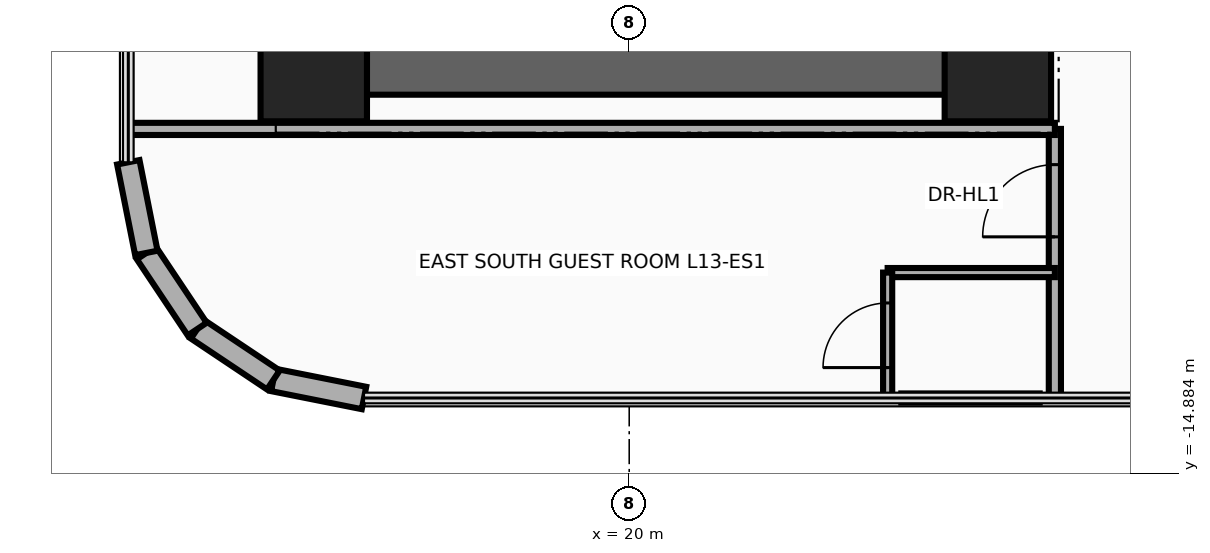
"""IFC4 building model, lengths in metres.
Left out: names, types, materials, properties, quantities, classifications, styles, units other than length and angle.
Written with IfcOpenShell. Run it as: python <this file> out.ifc"""

import sys

from ifc_helpers import new_model, si_unit, direction, frame, frame_2d, origin, origin_2d, place, context, subcontext, project, spatial, rectangle, extrude, source, transform, mapped, element, fill, save


model = new_model("IFC4")
c1 = context("Model", 3, precision=1e-05, world=origin(), true_north=direction((0.0, 1.0)))
c2 = subcontext(c1, "Body", "Model", "MODEL_VIEW")
j1 = project(units=[si_unit("LENGTHUNIT", "METRE"), si_unit("PLANEANGLEUNIT", "RADIAN")], contexts=[c1])
p1 = place(None, origin())
s1 = spatial("IfcSite", under=j1, at=p1, CompositionType="ELEMENT")
p2 = place(p1, origin())
s2 = spatial("IfcBuilding", under=s1, at=p2, CompositionType="ELEMENT")
p3 = place(p2, frame((0.0, 0.0, 55.6)))
s3 = spatial("IfcBuildingStorey", under=s2, at=p3, CompositionType="ELEMENT", Elevation=55.6)
p4 = place(p3, frame((24.85, -9.9, 0.0), z_axis=(0.0, 0.0, 1.0), x_axis=(0.0, 1.0, 0.0)))
e1 = element("IfcWall", 1, at=p4, inside=s3, PredefinedType="SHEAR", context=c2, shape_type="SweptSolid", body=[
    extrude(rectangle(XDim=8.95, YDim=0.7, at=frame_2d((4.475, 0.0))), origin(), (0.0, 0.0, 1.0), 3.46),
])
p5 = place(p3, frame((15.85, -9.55, 0.0), z_axis=(0.0, 0.0, 1.0), x_axis=(1.0, 0.0, 0.0)))
e2 = element("IfcWall", 2, at=p5, inside=s3, PredefinedType="SHEAR", context=c2, shape_type="SweptSolid", body=[
    extrude(rectangle(XDim=9.0, YDim=0.7, at=frame_2d((4.5, 0.0))), origin(), (0.0, 0.0, 1.0), 3.46),
])
m1 = source(origin(), c2, "Body", "SweptSolid", [
    extrude(rectangle(XDim=1.4, YDim=1.4, at=origin_2d()), origin(), (0.0, 0.0, 1.0), 3.7),
])
for number, where, z_axis, x_axis in (
    (3, (15.85, -9.55, 0.0), (0.0, 0.0, 1.0), (1.0, 0.0, 0.0)),
    (4, (24.85, -9.55, 0.0), (0.0, 0.0, 1.0), (1.0, 0.0, 0.0)),
):
    element("IfcColumn", number, at=place(p3, frame(where, z_axis=z_axis, x_axis=x_axis)), inside=s3, PredefinedType="COLUMN", context=c2, shape_type="MappedRepresentation", body=[
        mapped(m1, transform((0.0, 0.0, 0.0), x_axis=(1.0, 0.0, 0.0), y_axis=(0.0, 1.0, 0.0), z_axis=(0.0, 0.0, 1.0), scale=1.0)),
    ])
p6 = place(p3, frame((16.511, -13.89, 0.0), z_axis=(0.0, 0.0, 1.0), x_axis=(-0.980804027463, 0.194996050505, 0.0)))
e5 = element("IfcWall", 5, at=p6, inside=s3, PredefinedType="SOLIDWALL", context=c2, shape_type="SweptSolid", body=[
    extrude(rectangle(XDim=1.216, YDim=0.3, at=frame_2d((0.608, 0.0))), origin(), (0.0, 0.0, 1.0), 3.46),
])
for number, where, z_axis, x_axis in (
    (6, (15.318, -13.653, 0.0), (0.0, 0.0, 1.0), (-0.831, 0.556, 0.0)),
    (7, (14.317, -12.983, 0.0), (0.0, 0.0, 1.0), (-0.556, 0.831, 0.0)),
):
    element("IfcWall", number, at=place(p3, frame(where, z_axis=z_axis, x_axis=x_axis)), inside=s3, PredefinedType="SOLIDWALL", context=c2, shape_type="SweptSolid", body=[
        extrude(rectangle(XDim=1.205, YDim=0.3, at=frame_2d((0.603, 0.0))), origin(), (0.0, 0.0, 1.0), 3.46),
    ])
p7 = place(p3, frame((13.647, -11.982, 0.0), z_axis=(0.0, 0.0, 1.0), x_axis=(-0.195189223115, 0.980765602568, 0.0)))
e8 = element("IfcWall", 8, at=p7, inside=s3, PredefinedType="SOLIDWALL", context=c2, shape_type="SweptSolid", body=[
    extrude(rectangle(XDim=1.216, YDim=0.3, at=frame_2d((0.608, 0.0))), origin(), (0.0, 0.0, 1.0), 3.46),
])
p8 = place(p3, frame((25.6, -13.89, 0.0), z_axis=(0.0, 0.0, 1.0), x_axis=(0.0, 1.0, 0.0)))
e9 = element("IfcWall", 9, at=p8, inside=s3, PredefinedType="PARTITIONING", context=c2, shape_type="SweptSolid", body=[
    extrude(rectangle(XDim=3.54, YDim=0.16, at=frame_2d((1.77, 0.0))), origin(), (0.0, 0.0, 1.0), 3.46),
])
p9 = place(p8, frame((2.12, 0.0, 0.0)))
e10 = element("IfcOpeningElement", 10, at=p9, cuts=e9, PredefinedType="OPENING", context=c2, shape_type="SweptSolid", body=[
    extrude(rectangle(XDim=0.95, YDim=2.15, at=frame_2d((0.475, 1.075))), frame((0.0, 0.095, 0.0), z_axis=(0.0, -1.0, 0.0), x_axis=(1.0, 0.0, 0.0)), (0.0, 0.0, 1.0), 0.19),
])
p10 = place(p3, frame((13.41, -10.35, 0.0), z_axis=(0.0, 0.0, 1.0), x_axis=(1.0, 0.0, 0.0)))
e11 = element("IfcWall", 11, at=p10, inside=s3, PredefinedType="PARTITIONING", context=c2, shape_type="SweptSolid", body=[
    extrude(rectangle(XDim=12.19, YDim=0.16, at=frame_2d((6.095, 0.0))), origin(), (0.0, 0.0, 1.0), 3.46),
])
p11 = place(p3, frame((23.4, -12.24, 0.0), z_axis=(0.0, 0.0, 1.0), x_axis=(1.0, 0.0, 0.0)))
e12 = element("IfcWall", 12, at=p11, inside=s3, PredefinedType="PARTITIONING", context=c2, shape_type="SweptSolid", body=[
    extrude(rectangle(XDim=2.2, YDim=0.12, at=frame_2d((1.1, 0.0))), origin(), (0.0, 0.0, 1.0), 3.46),
])
p12 = place(p3, frame((23.4, -13.89, 0.0), z_axis=(0.0, 0.0, 1.0), x_axis=(0.0, 1.0, 0.0)))
e13 = element("IfcWall", 13, at=p12, inside=s3, PredefinedType="PARTITIONING", context=c2, shape_type="SweptSolid", body=[
    extrude(rectangle(XDim=1.65, YDim=0.12, at=frame_2d((0.825, 0.0))), origin(), (0.0, 0.0, 1.0), 3.46),
])
p13 = place(p12, frame((0.4, 0.0, 0.0)))
e14 = element("IfcOpeningElement", 14, at=p13, cuts=e13, PredefinedType="OPENING", context=c2, shape_type="SweptSolid", body=[
    extrude(rectangle(XDim=0.85, YDim=2.1, at=frame_2d((0.425, 1.05))), frame((0.0, 0.075, 0.0), z_axis=(0.0, -1.0, 0.0), x_axis=(1.0, 0.0, 0.0)), (0.0, 0.0, 1.0), 0.15),
])
p14 = place(p3, frame((23.58, -13.89, 0.0), z_axis=(0.0, 0.0, 1.0), x_axis=(1.0, 0.0, 0.0)))
e15 = element("IfcWall", 15, at=p14, inside=s3, PredefinedType="PARTITIONING", context=c2, shape_type="SweptSolid", body=[
    extrude(rectangle(XDim=1.82, YDim=0.12, at=frame_2d((0.91, 0.0))), origin(), (0.0, 0.0, 1.0), 3.46),
])
p15 = place(p9, origin())
e16 = element("IfcDoor", 16, at=p15, inside=s3, OperationType="SINGLE_SWING_RIGHT", PredefinedType="DOOR", context=c2, shape_type="SweptSolid", body=[
    extrude(rectangle(XDim=0.95, YDim=2.15, at=frame_2d((0.475, 1.075))), frame((0.0, 0.025, 0.0), z_axis=(0.0, -1.0, 0.0), x_axis=(1.0, 0.0, 0.0)), (0.0, 0.0, 1.0), 0.05),
])
fill(e10, e16)
p16 = place(p13, origin())
e17 = element("IfcDoor", 17, at=p16, inside=s3, OperationType="SINGLE_SWING_LEFT", PredefinedType="DOOR", context=c2, shape_type="SweptSolid", body=[
    extrude(rectangle(XDim=0.85, YDim=2.1, at=frame_2d((0.425, 1.05))), frame((0.0, 0.025, 0.0), z_axis=(0.0, -1.0, 0.0), x_axis=(1.0, 0.0, 0.0)), (0.0, 0.0, 1.0), 0.05),
])
fill(e14, e17)
save(model, sys.argv[1])
